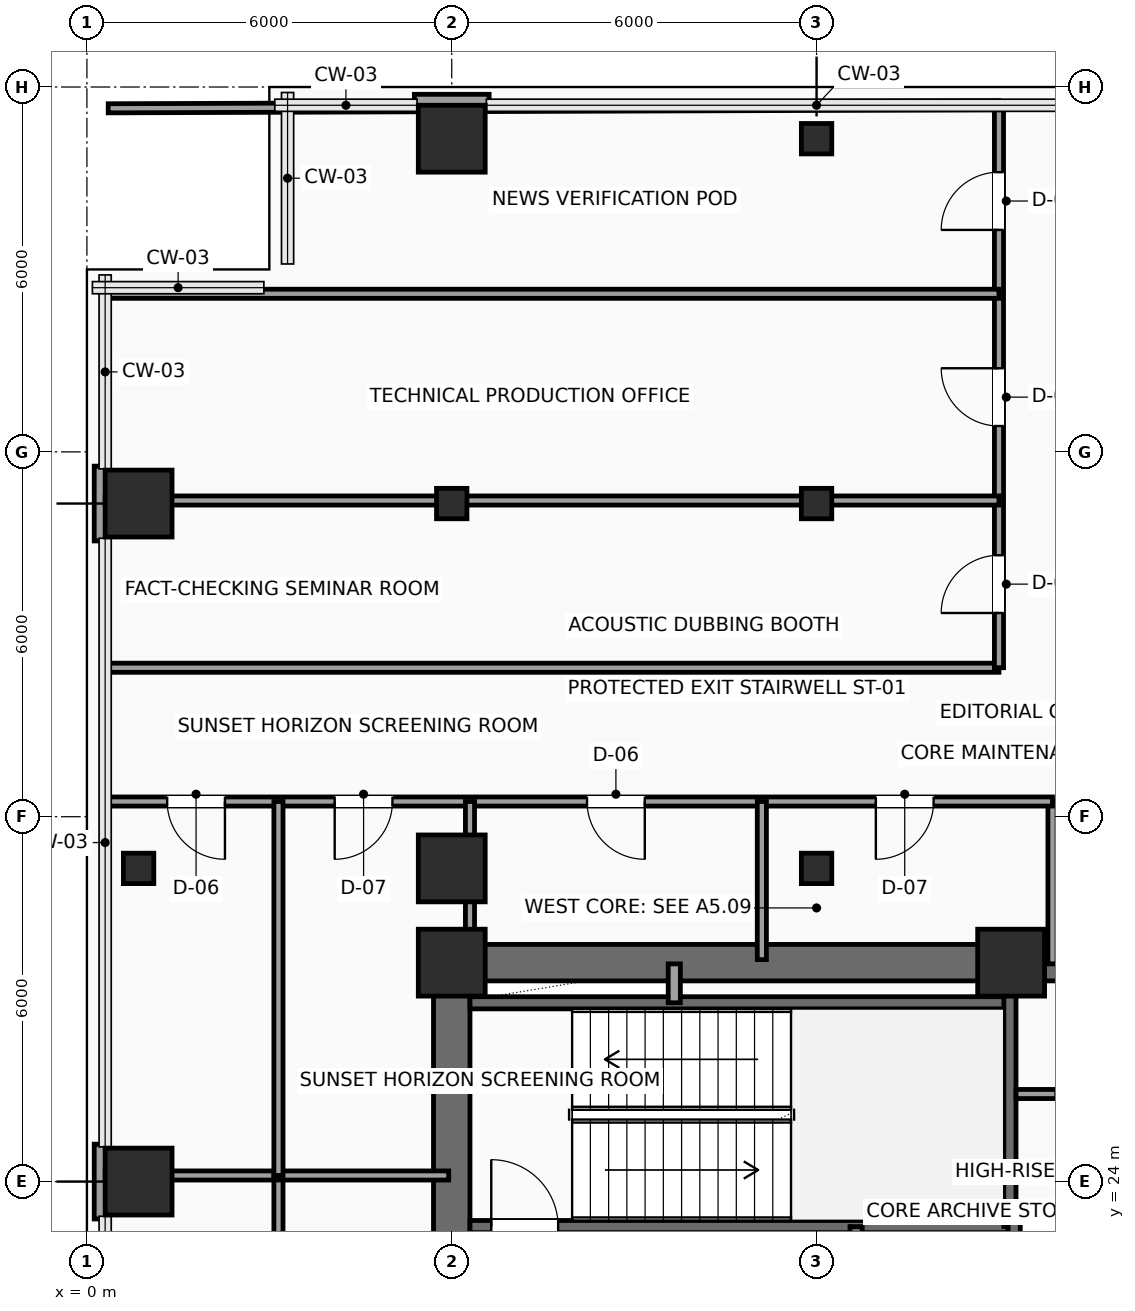
"""IFC4 building model, lengths in metres.
Left out: names, types, materials, properties, quantities, classifications, styles, units other than length and angle.
Written with IfcOpenShell. Run it as: python <this file> out.ifc"""

import sys

from ifc_helpers import new_model, si_unit, direction, frame, frame_2d, origin, origin_2d, place, context, subcontext, project, spatial, rectangle, hollow_rectangle, extrude, element, fill, save


model = new_model("IFC4")
c1 = context("Model", 3, precision=1e-05, world=origin(), true_north=direction((0.0, 1.0)))
c2 = subcontext(c1, "Body", "Model", "MODEL_VIEW")
j1 = project(units=[si_unit("LENGTHUNIT", "METRE"), si_unit("PLANEANGLEUNIT", "RADIAN")], contexts=[c1])
p1 = place(None, origin())
s1 = spatial("IfcSite", under=j1, at=p1, CompositionType="ELEMENT")
p2 = place(p1, origin())
s2 = spatial("IfcBuilding", under=s1, at=p2, CompositionType="ELEMENT")
p3 = place(p2, frame((0.0, 0.0, 160.65)))
s3 = spatial("IfcBuildingStorey", under=s2, at=p3, CompositionType="ELEMENT", Elevation=160.65)
for number, where, z_axis, x_axis in (
    (1, (6.0, 27.6, 0.0), (0.0, 0.0, 1.0), (1.0, 0.0, 0.0)),
    (2, (15.2, 27.6, 0.0), (0.0, 0.0, 1.0), (1.0, 0.0, 0.0)),
    (3, (0.85, 24.0, 0.0), (0.0, 0.0, 1.0), (1.0, 0.0, 0.0)),
):
    element("IfcColumn", number, at=place(p3, frame(where, z_axis=z_axis, x_axis=x_axis)), inside=s3, PredefinedType="COLUMN", context=c2, shape_type="SweptSolid", body=[
        extrude(rectangle(XDim=1.1, YDim=1.1, at=origin_2d()), origin(), (0.0, 0.0, 1.0), 3.75),
    ])
p4 = place(p3, frame((0.85, 29.15, 0.0), z_axis=(0.0, 0.0, 1.0), x_axis=(1.0, 0.0, 0.0)))
e4 = element("IfcColumn", 4, at=p4, inside=s3, PredefinedType="COLUMN", context=c2, shape_type="SweptSolid", body=[
    extrude(hollow_rectangle(XDim=0.5, YDim=0.5, WallThickness=0.025, InnerFilletRadius=0.025, OuterFilletRadius=0.04, at=origin_2d()), origin(), (0.0, 0.0, 1.0), 3.75),
])
for number, where, z_axis, x_axis in (
    (5, (0.85, 35.15, 0.0), (0.0, 0.0, 1.0), (1.0, 0.0, 0.0)),
    (6, (6.0, 29.15, 0.0), (0.0, 0.0, 1.0), (1.0, 0.0, 0.0)),
):
    element("IfcColumn", number, at=place(p3, frame(where, z_axis=z_axis, x_axis=x_axis)), inside=s3, PredefinedType="COLUMN", context=c2, shape_type="SweptSolid", body=[
        extrude(rectangle(XDim=1.1, YDim=1.1, at=origin_2d()), origin(), (0.0, 0.0, 1.0), 3.75),
    ])
p5 = place(p3, frame((6.0, 35.15, 0.0), z_axis=(0.0, 0.0, 1.0), x_axis=(1.0, 0.0, 0.0)))
e7 = element("IfcColumn", 7, at=p5, inside=s3, PredefinedType="COLUMN", context=c2, shape_type="SweptSolid", body=[
    extrude(hollow_rectangle(XDim=0.5, YDim=0.5, WallThickness=0.025, InnerFilletRadius=0.025, OuterFilletRadius=0.04, at=origin_2d()), origin(), (0.0, 0.0, 1.0), 3.75),
])
p6 = place(p3, frame((6.0, 41.15, 0.0), z_axis=(0.0, 0.0, 1.0), x_axis=(1.0, 0.0, 0.0)))
e8 = element("IfcColumn", 8, at=p6, inside=s3, PredefinedType="COLUMN", context=c2, shape_type="SweptSolid", body=[
    extrude(rectangle(XDim=1.1, YDim=1.1, at=origin_2d()), origin(), (0.0, 0.0, 1.0), 3.75),
])
for number, where, z_axis, x_axis in (
    (9, (12.0, 29.15, 0.0), (0.0, 0.0, 1.0), (1.0, 0.0, 0.0)),
    (10, (12.0, 35.15, 0.0), (0.0, 0.0, 1.0), (1.0, 0.0, 0.0)),
    (11, (12.0, 41.15, 0.0), (0.0, 0.0, 1.0), (1.0, 0.0, 0.0)),
):
    element("IfcColumn", number, at=place(p3, frame(where, z_axis=z_axis, x_axis=x_axis)), inside=s3, PredefinedType="COLUMN", context=c2, shape_type="SweptSolid", body=[
        extrude(hollow_rectangle(XDim=0.5, YDim=0.5, WallThickness=0.025, InnerFilletRadius=0.025, OuterFilletRadius=0.04, at=origin_2d()), origin(), (0.0, 0.0, 1.0), 3.75),
    ])
for number, where, z_axis, x_axis in (
    (12, (0.24, 23.385, 0.0), (0.0, 0.0, 1.0), (0.0, 1.0, 0.0)),
    (13, (0.24, 34.535, 0.0), (0.0, 0.0, 1.0), (0.0, 1.0, 0.0)),
    (14, (5.385, 41.76, 0.0), (0.0, 0.0, 1.0), (1.0, 0.0, 0.0)),
):
    element("IfcWall", number, at=place(p3, frame(where, z_axis=z_axis, x_axis=x_axis)), inside=s3, PredefinedType="SOLIDWALL", context=c2, shape_type="SweptSolid", body=[
        extrude(rectangle(XDim=1.23, YDim=0.24, at=frame_2d((0.615, 0.0))), origin(), (0.0, 0.0, 1.0), 3.425),
    ])
p7 = place(p3, frame((6.0, 27.6, 0.0), z_axis=(0.0, 0.0, 1.0), x_axis=(1.0, 0.0, 0.0)))
e15 = element("IfcWall", 15, at=p7, inside=s3, PredefinedType="SHEAR", context=c2, shape_type="SweptSolid", body=[
    extrude(rectangle(XDim=12.0, YDim=0.6, at=frame_2d((6.0, 0.0))), origin(), (0.0, 0.0, 1.0), 3.425),
])
p8 = place(p7, frame((10.2, 0.0, 0.0)))
e16 = element("IfcOpeningElement", 16, at=p8, cuts=e15, PredefinedType="OPENING", context=c2, shape_type="SweptSolid", body=[
    extrude(rectangle(XDim=0.9, YDim=2.15, at=frame_2d((0.45, 1.075))), frame((0.0, 0.31, 0.0), z_axis=(0.0, -1.0, 0.0), x_axis=(1.0, 0.0, 0.0)), (0.0, 0.0, 1.0), 0.62),
])
p9 = place(p3, frame((6.0, 18.0, 0.0), z_axis=(0.0, 0.0, 1.0), x_axis=(0.0, 1.0, 0.0)))
e17 = element("IfcWall", 17, at=p9, inside=s3, PredefinedType="SHEAR", context=c2, shape_type="SweptSolid", body=[
    extrude(rectangle(XDim=9.6, YDim=0.6, at=frame_2d((4.8, 0.0))), origin(), (0.0, 0.0, 1.0), 3.425),
])
p10 = place(p3, frame((6.3, 23.26, 0.0), z_axis=(0.0, 0.0, 1.0), x_axis=(1.0, 0.0, 0.0)))
e18 = element("IfcWall", 18, at=p10, inside=s3, PredefinedType="SHEAR", context=c2, shape_type="SweptSolid", body=[
    extrude(rectangle(XDim=8.88, YDim=0.2, at=frame_2d((4.44, 0.0))), origin(), (0.0, 0.0, 1.0), 3.425),
])
p11 = place(p10, frame((0.35, 0.0, 0.0)))
e19 = element("IfcOpeningElement", 19, at=p11, cuts=e18, PredefinedType="OPENING", context=c2, shape_type="SweptSolid", body=[
    extrude(rectangle(XDim=1.1, YDim=2.2, at=frame_2d((0.55, 1.1))), frame((0.0, 0.11, 0.0), z_axis=(0.0, -1.0, 0.0), x_axis=(1.0, 0.0, 0.0)), (0.0, 0.0, 1.0), 0.22),
])
p12 = place(p3, frame((6.3, 26.94, 0.0), z_axis=(0.0, 0.0, 1.0), x_axis=(1.0, 0.0, 0.0)))
e20 = element("IfcWall", 20, at=p12, inside=s3, PredefinedType="SHEAR", context=c2, shape_type="SweptSolid", body=[
    extrude(rectangle(XDim=8.88, YDim=0.2, at=frame_2d((4.44, 0.0))), origin(), (0.0, 0.0, 1.0), 3.425),
])
p13 = place(p3, frame((15.18, 23.26, 0.0), z_axis=(0.0, 0.0, 1.0), x_axis=(0.0, 1.0, 0.0)))
e21 = element("IfcWall", 21, at=p13, inside=s3, PredefinedType="SHEAR", context=c2, shape_type="SweptSolid", body=[
    extrude(rectangle(XDim=4.04, YDim=0.2, at=frame_2d((2.02, 0.0))), origin(), (0.0, 0.0, 1.0), 3.425),
])
p14 = place(p3, frame((12.65, 20.42, 0.0), z_axis=(0.0, 0.0, 1.0), x_axis=(0.0, 1.0, 0.0)))
e22 = element("IfcWall", 22, at=p14, inside=s3, PredefinedType="SHEAR", context=c2, shape_type="SweptSolid", body=[
    extrude(rectangle(XDim=2.84, YDim=0.2, at=frame_2d((1.42, 0.0))), origin(), (0.0, 0.0, 1.0), 3.425),
])
p15 = place(p14, frame((0.9, 0.0, 0.0)))
e23 = element("IfcOpeningElement", 23, at=p15, cuts=e22, PredefinedType="OPENING", context=c2, shape_type="SweptSolid", body=[
    extrude(rectangle(XDim=0.9, YDim=2.15, at=frame_2d((0.45, 1.075))), frame((0.0, 0.11, 0.0), z_axis=(0.0, -1.0, 0.0), x_axis=(1.0, 0.0, 0.0)), (0.0, 0.0, 1.0), 0.22),
])
p16 = place(p3, frame((9.66, 26.94, 0.0), z_axis=(0.0, 0.0, 1.0), x_axis=(0.0, 1.0, 0.0)))
e24 = element("IfcWall", 24, at=p16, inside=s3, PredefinedType="SOLIDWALL", context=c2, shape_type="SweptSolid", body=[
    extrude(rectangle(XDim=0.64, YDim=0.2, at=frame_2d((0.32, 0.0))), origin(), (0.0, 0.0, 1.0), 3.425),
])
p17 = place(p3, frame((15.25, 18.25, 0.0), z_axis=(0.0, 0.0, 1.0), x_axis=(0.0, 1.0, 0.0)))
e25 = element("IfcWall", 25, at=p17, inside=s3, PredefinedType="SHEAR", context=c2, shape_type="SweptSolid", body=[
    extrude(rectangle(XDim=5.2, YDim=0.2, at=frame_2d((2.6, 0.0))), origin(), (0.0, 0.0, 1.0), 3.425),
])
p18 = place(p3, frame((15.25, 23.45, 0.0), z_axis=(0.0, 0.0, 1.0), x_axis=(1.0, 0.0, 0.0)))
e26 = element("IfcWall", 26, at=p18, inside=s3, PredefinedType="SHEAR", context=c2, shape_type="SweptSolid", body=[
    extrude(rectangle(XDim=2.45, YDim=0.2, at=frame_2d((1.225, 0.0))), origin(), (0.0, 0.0, 1.0), 3.425),
])
p19 = place(p3, frame((15.28, 25.44, 0.0), z_axis=(0.0, 0.0, 1.0), x_axis=(1.0, 0.0, 0.0)))
e27 = element("IfcWall", 27, at=p19, inside=s3, PredefinedType="PARTITIONING", context=c2, shape_type="SweptSolid", body=[
    extrude(rectangle(XDim=2.42, YDim=0.15, at=frame_2d((1.21, 0.0))), origin(), (0.0, 0.0, 1.0), 3.425),
])
p20 = place(p19, frame((0.65, 0.0, 0.0)))
e28 = element("IfcOpeningElement", 28, at=p20, cuts=e27, PredefinedType="OPENING", context=c2, shape_type="SweptSolid", body=[
    extrude(rectangle(XDim=0.9, YDim=2.15, at=frame_2d((0.45, 1.075))), frame((0.0, 0.085, 0.0), z_axis=(0.0, -1.0, 0.0), x_axis=(1.0, 0.0, 0.0)), (0.0, 0.0, 1.0), 0.17),
])
p21 = place(p3, frame((15.88, 27.58, 0.0), z_axis=(0.0, 0.0, 1.0), x_axis=(0.0, 1.0, 0.0)))
e29 = element("IfcWall", 29, at=p21, inside=s3, PredefinedType="PARTITIONING", context=c2, shape_type="SweptSolid", body=[
    extrude(rectangle(XDim=2.67, YDim=0.15, at=frame_2d((1.335, 0.0))), origin(), (0.0, 0.0, 1.0), 3.425),
])
p22 = place(p3, frame((15.88, 30.25, 0.0), z_axis=(0.0, 0.0, 1.0), x_axis=(-1.0, 0.0, 0.0)))
e30 = element("IfcWall", 30, at=p22, inside=s3, PredefinedType="PARTITIONING", context=c2, shape_type="SweptSolid", body=[
    extrude(rectangle(XDim=15.58, YDim=0.15, at=frame_2d((7.79, 0.0))), origin(), (0.0, 0.0, 1.0), 3.425),
])
p23 = place(p22, frame((13.61, 0.0, 0.0)))
e31 = element("IfcOpeningElement", 31, at=p23, cuts=e30, PredefinedType="OPENING", context=c2, shape_type="SweptSolid", body=[
    extrude(rectangle(XDim=0.95, YDim=2.15, at=frame_2d((0.475, 1.075))), frame((0.0, 0.085, 0.0), z_axis=(0.0, -1.0, 0.0), x_axis=(1.0, 0.0, 0.0)), (0.0, 0.0, 1.0), 0.17),
])
p24 = place(p22, frame((10.855, 0.0, 0.0)))
e32 = element("IfcOpeningElement", 32, at=p24, cuts=e30, PredefinedType="OPENING", context=c2, shape_type="SweptSolid", body=[
    extrude(rectangle(XDim=0.95, YDim=2.15, at=frame_2d((0.475, 1.075))), frame((0.0, 0.085, 0.0), z_axis=(0.0, -1.0, 0.0), x_axis=(1.0, 0.0, 0.0)), (0.0, 0.0, 1.0), 0.17),
])
p25 = place(p22, frame((6.705, 0.0, 0.0)))
e33 = element("IfcOpeningElement", 33, at=p25, cuts=e30, PredefinedType="OPENING", context=c2, shape_type="SweptSolid", body=[
    extrude(rectangle(XDim=0.95, YDim=2.15, at=frame_2d((0.475, 1.075))), frame((0.0, 0.085, 0.0), z_axis=(0.0, -1.0, 0.0), x_axis=(1.0, 0.0, 0.0)), (0.0, 0.0, 1.0), 0.17),
])
p26 = place(p22, frame((1.955, 0.0, 0.0)))
e34 = element("IfcOpeningElement", 34, at=p26, cuts=e30, PredefinedType="OPENING", context=c2, shape_type="SweptSolid", body=[
    extrude(rectangle(XDim=0.95, YDim=2.15, at=frame_2d((0.475, 1.075))), frame((0.0, 0.085, 0.0), z_axis=(0.0, -1.0, 0.0), x_axis=(1.0, 0.0, 0.0)), (0.0, 0.0, 1.0), 0.17),
])
p27 = place(p3, frame((0.3, 32.45, 0.0), z_axis=(0.0, 0.0, 1.0), x_axis=(1.0, 0.0, 0.0)))
e35 = element("IfcWall", 35, at=p27, inside=s3, PredefinedType="PARTITIONING", context=c2, shape_type="SweptSolid", body=[
    extrude(rectangle(XDim=14.7, YDim=0.15, at=frame_2d((7.35, 0.0))), origin(), (0.0, 0.0, 1.0), 3.425),
])
p28 = place(p3, frame((15.0, 32.45, 0.0), z_axis=(0.0, 0.0, 1.0), x_axis=(0.0, 1.0, 0.0)))
e36 = element("IfcWall", 36, at=p28, inside=s3, PredefinedType="PARTITIONING", context=c2, shape_type="SweptSolid", body=[
    extrude(rectangle(XDim=9.25, YDim=0.15, at=frame_2d((4.625, 0.0))), origin(), (0.0, 0.0, 1.0), 3.425),
])
p29 = place(p28, frame((0.9, 0.0, 0.0)))
e37 = element("IfcOpeningElement", 37, at=p29, cuts=e36, PredefinedType="OPENING", context=c2, shape_type="SweptSolid", body=[
    extrude(rectangle(XDim=0.95, YDim=2.15, at=frame_2d((0.475, 1.075))), frame((0.0, 0.085, 0.0), z_axis=(0.0, -1.0, 0.0), x_axis=(1.0, 0.0, 0.0)), (0.0, 0.0, 1.0), 0.17),
])
p30 = place(p28, frame((3.975, 0.0, 0.0)))
e38 = element("IfcOpeningElement", 38, at=p30, cuts=e36, PredefinedType="OPENING", context=c2, shape_type="SweptSolid", body=[
    extrude(rectangle(XDim=0.95, YDim=2.15, at=frame_2d((0.475, 1.075))), frame((0.0, 0.085, 0.0), z_axis=(0.0, -1.0, 0.0), x_axis=(1.0, 0.0, 0.0)), (0.0, 0.0, 1.0), 0.17),
])
p31 = place(p28, frame((7.2, 0.0, 0.0)))
e39 = element("IfcOpeningElement", 39, at=p31, cuts=e36, PredefinedType="OPENING", context=c2, shape_type="SweptSolid", body=[
    extrude(rectangle(XDim=0.95, YDim=2.15, at=frame_2d((0.475, 1.075))), frame((0.0, 0.085, 0.0), z_axis=(0.0, -1.0, 0.0), x_axis=(1.0, 0.0, 0.0)), (0.0, 0.0, 1.0), 0.17),
])
p32 = place(p3, frame((0.3, 24.1, 0.0), z_axis=(0.0, 0.0, 1.0), x_axis=(1.0, 0.0, 0.0)))
e40 = element("IfcWall", 40, at=p32, inside=s3, PredefinedType="PARTITIONING", context=c2, shape_type="SweptSolid", body=[
    extrude(rectangle(XDim=2.85, YDim=0.15, at=frame_2d((1.425, 0.0))), origin(), (0.0, 0.0, 1.0), 3.425),
])
p33 = place(p3, frame((3.15, 18.0, 0.0), z_axis=(0.0, 0.0, 1.0), x_axis=(0.0, 1.0, 0.0)))
e41 = element("IfcWall", 41, at=p33, inside=s3, PredefinedType="PARTITIONING", context=c2, shape_type="SweptSolid", body=[
    extrude(rectangle(XDim=6.1, YDim=0.15, at=frame_2d((3.05, 0.0))), origin(), (0.0, 0.0, 1.0), 3.425),
])
p34 = place(p3, frame((3.15, 24.1, 0.0), z_axis=(0.0, 0.0, 1.0), x_axis=(1.0, 0.0, 0.0)))
e42 = element("IfcWall", 42, at=p34, inside=s3, PredefinedType="PARTITIONING", context=c2, shape_type="SweptSolid", body=[
    extrude(rectangle(XDim=2.8, YDim=0.15, at=frame_2d((1.4, 0.0))), origin(), (0.0, 0.0, 1.0), 3.425),
])
p35 = place(p3, frame((3.15, 24.1, 0.0), z_axis=(0.0, 0.0, 1.0), x_axis=(0.0, 1.0, 0.0)))
e43 = element("IfcWall", 43, at=p35, inside=s3, PredefinedType="PARTITIONING", context=c2, shape_type="SweptSolid", body=[
    extrude(rectangle(XDim=6.15, YDim=0.15, at=frame_2d((3.075, 0.0))), origin(), (0.0, 0.0, 1.0), 3.425),
])
p36 = place(p3, frame((6.3, 27.65, 0.0), z_axis=(0.0, 0.0, 1.0), x_axis=(0.0, 1.0, 0.0)))
e44 = element("IfcWall", 44, at=p36, inside=s3, PredefinedType="PARTITIONING", context=c2, shape_type="SweptSolid", body=[
    extrude(rectangle(XDim=2.6, YDim=0.15, at=frame_2d((1.3, 0.0))), origin(), (0.0, 0.0, 1.0), 2.917),
])
p37 = place(p3, frame((11.1, 27.65, 0.0), z_axis=(0.0, 0.0, 1.0), x_axis=(0.0, 1.0, 0.0)))
e45 = element("IfcWall", 45, at=p37, inside=s3, PredefinedType="PARTITIONING", context=c2, shape_type="SweptSolid", body=[
    extrude(rectangle(XDim=2.6, YDim=0.15, at=frame_2d((1.3, 0.0))), origin(), (0.0, 0.0, 1.0), 3.425),
])
p38 = place(p3, frame((0.3, 35.2, 0.0), z_axis=(0.0, 0.0, 1.0), x_axis=(1.0, 0.0, 0.0)))
e46 = element("IfcWall", 46, at=p38, inside=s3, PredefinedType="PARTITIONING", context=c2, shape_type="SweptSolid", body=[
    extrude(rectangle(XDim=14.7, YDim=0.15, at=frame_2d((7.35, 0.0))), origin(), (0.0, 0.0, 1.0), 2.917),
])
p39 = place(p3, frame((0.3, 38.6, 0.0), z_axis=(0.0, 0.0, 1.0), x_axis=(1.0, 0.0, 0.0)))
e47 = element("IfcWall", 47, at=p39, inside=s3, PredefinedType="PARTITIONING", context=c2, shape_type="SweptSolid", body=[
    extrude(rectangle(XDim=14.7, YDim=0.15, at=frame_2d((7.35, 0.0))), origin(), (0.0, 0.0, 1.0), 3.425),
])
p40 = place(p3, frame((0.35, 41.65, 0.0), z_axis=(0.0, 0.0, 1.0), x_axis=(0.999994073761, 0.003442737683, 0.0)))
e48 = element("IfcWall", 48, at=p40, inside=s3, PredefinedType="PARTITIONING", context=c2, shape_type="SweptSolid", body=[
    extrude(rectangle(XDim=5.035, YDim=0.15, at=frame_2d((2.518, 0.0))), origin(), (0.0, 0.0, 1.0), 3.425),
])
p41 = place(p3, frame((6.615, 41.671, 0.0), z_axis=(0.0, 0.0, 1.0), x_axis=(0.999994197557, 0.003406589638, 0.0)))
e49 = element("IfcWall", 49, at=p41, inside=s3, PredefinedType="PARTITIONING", context=c2, shape_type="SweptSolid", body=[
    extrude(rectangle(XDim=8.385, YDim=0.15, at=frame_2d((4.192, 0.0))), origin(), (0.0, 0.0, 1.0), 3.425),
])
p42 = place(p11, origin())
e50 = element("IfcDoor", 50, at=p42, inside=s3, OperationType="SINGLE_SWING_LEFT", PredefinedType="DOOR", context=c2, shape_type="SweptSolid", body=[
    extrude(rectangle(XDim=1.1, YDim=2.2, at=frame_2d((0.55, 1.1))), frame((0.0, 0.025, 0.0), z_axis=(0.0, -1.0, 0.0), x_axis=(1.0, 0.0, 0.0)), (0.0, 0.0, 1.0), 0.05),
])
fill(e19, e50)
p43 = place(p23, origin())
e51 = element("IfcDoor", 51, at=p43, inside=s3, OperationType="SINGLE_SWING_LEFT", PredefinedType="DOOR", context=c2, shape_type="SweptSolid", body=[
    extrude(rectangle(XDim=0.95, YDim=2.15, at=frame_2d((0.475, 1.075))), frame((0.0, 0.025, 0.0), z_axis=(0.0, -1.0, 0.0), x_axis=(1.0, 0.0, 0.0)), (0.0, 0.0, 1.0), 0.05),
])
fill(e31, e51)
p44 = place(p24, origin())
e52 = element("IfcDoor", 52, at=p44, inside=s3, OperationType="SINGLE_SWING_RIGHT", PredefinedType="DOOR", context=c2, shape_type="SweptSolid", body=[
    extrude(rectangle(XDim=0.95, YDim=2.15, at=frame_2d((0.475, 1.075))), frame((0.0, 0.025, 0.0), z_axis=(0.0, -1.0, 0.0), x_axis=(1.0, 0.0, 0.0)), (0.0, 0.0, 1.0), 0.05),
])
fill(e32, e52)
p45 = place(p25, origin())
e53 = element("IfcDoor", 53, at=p45, inside=s3, OperationType="SINGLE_SWING_LEFT", PredefinedType="DOOR", context=c2, shape_type="SweptSolid", body=[
    extrude(rectangle(XDim=0.95, YDim=2.15, at=frame_2d((0.475, 1.075))), frame((0.0, 0.025, 0.0), z_axis=(0.0, -1.0, 0.0), x_axis=(1.0, 0.0, 0.0)), (0.0, 0.0, 1.0), 0.05),
])
fill(e33, e53)
p46 = place(p26, origin())
e54 = element("IfcDoor", 54, at=p46, inside=s3, OperationType="SINGLE_SWING_RIGHT", PredefinedType="DOOR", context=c2, shape_type="SweptSolid", body=[
    extrude(rectangle(XDim=0.95, YDim=2.15, at=frame_2d((0.475, 1.075))), frame((0.0, 0.025, 0.0), z_axis=(0.0, -1.0, 0.0), x_axis=(1.0, 0.0, 0.0)), (0.0, 0.0, 1.0), 0.05),
])
fill(e34, e54)
p47 = place(p29, origin())
e55 = element("IfcDoor", 55, at=p47, inside=s3, OperationType="SINGLE_SWING_LEFT", PredefinedType="DOOR", context=c2, shape_type="SweptSolid", body=[
    extrude(rectangle(XDim=0.95, YDim=2.15, at=frame_2d((0.475, 1.075))), frame((0.0, 0.025, 0.0), z_axis=(0.0, -1.0, 0.0), x_axis=(1.0, 0.0, 0.0)), (0.0, 0.0, 1.0), 0.05),
])
fill(e37, e55)
p48 = place(p30, origin())
e56 = element("IfcDoor", 56, at=p48, inside=s3, OperationType="SINGLE_SWING_RIGHT", PredefinedType="DOOR", context=c2, shape_type="SweptSolid", body=[
    extrude(rectangle(XDim=0.95, YDim=2.15, at=frame_2d((0.475, 1.075))), frame((0.0, 0.025, 0.0), z_axis=(0.0, -1.0, 0.0), x_axis=(1.0, 0.0, 0.0)), (0.0, 0.0, 1.0), 0.05),
])
fill(e38, e56)
p49 = place(p31, origin())
e57 = element("IfcDoor", 57, at=p49, inside=s3, OperationType="SINGLE_SWING_LEFT", PredefinedType="DOOR", context=c2, shape_type="SweptSolid", body=[
    extrude(rectangle(XDim=0.95, YDim=2.15, at=frame_2d((0.475, 1.075))), frame((0.0, 0.025, 0.0), z_axis=(0.0, -1.0, 0.0), x_axis=(1.0, 0.0, 0.0)), (0.0, 0.0, 1.0), 0.05),
])
fill(e39, e57)
save(model, sys.argv[1])
